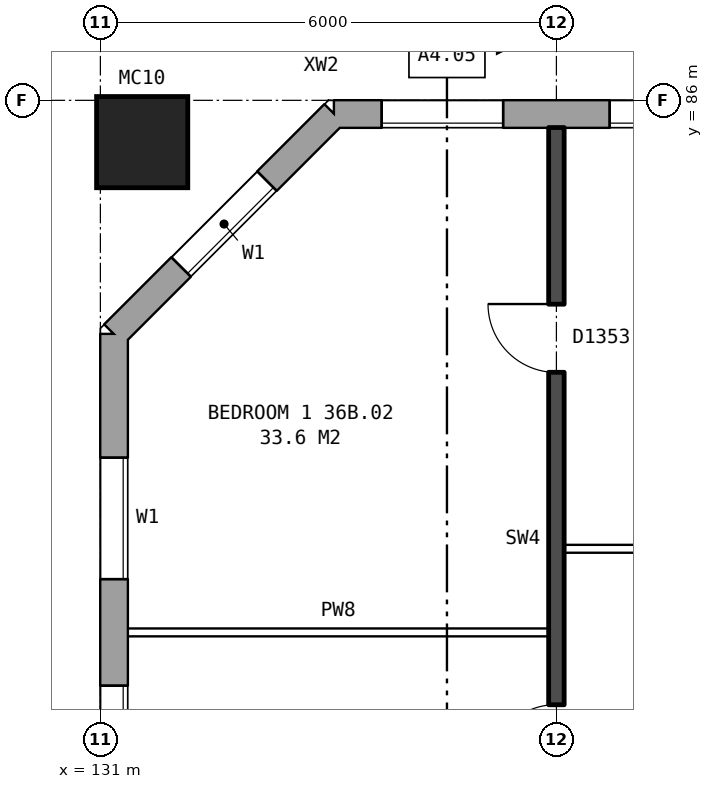
"""IFC4 building model, lengths in metres.
Left out: names, types, materials, properties, quantities, classifications, styles, units other than length and angle.
Written with IfcOpenShell. Run it as: python <this file> out.ifc"""

import sys

from ifc_helpers import new_model, si_unit, direction, frame, frame_2d, origin, origin_2d, place, context, subcontext, project, spatial, rectangle, hollow_rectangle, extrude, element, fill, save


model = new_model("IFC4")
c1 = context("Model", 3, precision=1e-05, world=origin(), true_north=direction((0.0, 1.0)))
c2 = subcontext(c1, "Body", "Model", "MODEL_VIEW")
j1 = project(units=[si_unit("LENGTHUNIT", "METRE"), si_unit("PLANEANGLEUNIT", "RADIAN")], contexts=[c1])
p1 = place(None, origin())
s1 = spatial("IfcSite", under=j1, at=p1, CompositionType="ELEMENT")
p2 = place(p1, origin())
s2 = spatial("IfcBuilding", under=s1, at=p2, CompositionType="ELEMENT")
p3 = place(p2, frame((0.0, 0.0, 129.9)))
s3 = spatial("IfcBuildingStorey", under=s2, at=p3, CompositionType="ELEMENT", Elevation=129.9)
p4 = place(p3, frame((131.55, 85.45, 0.0), z_axis=(0.0, 0.0, 1.0), x_axis=(1.0, 0.0, 0.0)))
e1 = element("IfcColumn", 1, at=p4, inside=s3, PredefinedType="COLUMN", context=c2, shape_type="SweptSolid", body=[
    extrude(hollow_rectangle(XDim=1.2, YDim=1.2, WallThickness=0.065, at=origin_2d()), origin(), (0.0, 0.0, 1.0), 3.1),
])
p5 = place(p3, frame((169.675, 85.82, 0.0), z_axis=(0.0, 0.0, 1.0), x_axis=(-1.0, 0.0, 0.0)))
e2 = element("IfcWall", 2, at=p5, inside=s3, PredefinedType="STANDARD", context=c2, shape_type="SweptSolid", body=[
    extrude(rectangle(XDim=35.601, YDim=0.36, at=frame_2d((17.8, 0.0))), origin(), (0.0, 0.0, 1.0), 2.85),
])
p6 = place(p5, frame((0.375, 0.0, 0.8)))
e3 = element("IfcOpeningElement", 3, at=p6, cuts=e2, PredefinedType="OPENING", context=c2, shape_type="SweptSolid", body=[
    extrude(rectangle(XDim=1.6, YDim=1.8, at=frame_2d((0.8, 0.9))), frame((0.0, 0.19, 0.0), z_axis=(0.0, -1.0, 0.0), x_axis=(1.0, 0.0, 0.0)), (0.0, 0.0, 1.0), 0.38),
])
p7 = place(p5, frame((3.375, 0.0, 0.8)))
e4 = element("IfcOpeningElement", 4, at=p7, cuts=e2, PredefinedType="OPENING", context=c2, shape_type="SweptSolid", body=[
    extrude(rectangle(XDim=1.6, YDim=1.8, at=frame_2d((0.8, 0.9))), frame((0.0, 0.19, 0.0), z_axis=(0.0, -1.0, 0.0), x_axis=(1.0, 0.0, 0.0)), (0.0, 0.0, 1.0), 0.38),
])
p8 = place(p5, frame((5.275, 0.0, 0.8)))
e5 = element("IfcOpeningElement", 5, at=p8, cuts=e2, PredefinedType="OPENING", context=c2, shape_type="SweptSolid", body=[
    extrude(rectangle(XDim=1.6, YDim=1.8, at=frame_2d((0.8, 0.9))), frame((0.0, 0.19, 0.0), z_axis=(0.0, -1.0, 0.0), x_axis=(1.0, 0.0, 0.0)), (0.0, 0.0, 1.0), 0.38),
])
p9 = place(p5, frame((9.375, 0.0, 0.8)))
e6 = element("IfcOpeningElement", 6, at=p9, cuts=e2, PredefinedType="OPENING", context=c2, shape_type="SweptSolid", body=[
    extrude(rectangle(XDim=1.6, YDim=1.8, at=frame_2d((0.8, 0.9))), frame((0.0, 0.19, 0.0), z_axis=(0.0, -1.0, 0.0), x_axis=(1.0, 0.0, 0.0)), (0.0, 0.0, 1.0), 0.38),
])
p10 = place(p5, frame((12.375, 0.0, 0.8)))
e7 = element("IfcOpeningElement", 7, at=p10, cuts=e2, PredefinedType="OPENING", context=c2, shape_type="SweptSolid", body=[
    extrude(rectangle(XDim=1.6, YDim=1.8, at=frame_2d((0.8, 0.9))), frame((0.0, 0.19, 0.0), z_axis=(0.0, -1.0, 0.0), x_axis=(1.0, 0.0, 0.0)), (0.0, 0.0, 1.0), 0.38),
])
p11 = place(p5, frame((15.375, 0.0, 0.8)))
e8 = element("IfcOpeningElement", 8, at=p11, cuts=e2, PredefinedType="OPENING", context=c2, shape_type="SweptSolid", body=[
    extrude(rectangle(XDim=1.6, YDim=1.8, at=frame_2d((0.8, 0.9))), frame((0.0, 0.19, 0.0), z_axis=(0.0, -1.0, 0.0), x_axis=(1.0, 0.0, 0.0)), (0.0, 0.0, 1.0), 0.38),
])
p12 = place(p5, frame((18.375, 0.0, 0.8)))
e9 = element("IfcOpeningElement", 9, at=p12, cuts=e2, PredefinedType="OPENING", context=c2, shape_type="SweptSolid", body=[
    extrude(rectangle(XDim=1.6, YDim=1.8, at=frame_2d((0.8, 0.9))), frame((0.0, 0.19, 0.0), z_axis=(0.0, -1.0, 0.0), x_axis=(1.0, 0.0, 0.0)), (0.0, 0.0, 1.0), 0.38),
])
p13 = place(p5, frame((21.375, 0.0, 0.8)))
e10 = element("IfcOpeningElement", 10, at=p13, cuts=e2, PredefinedType="OPENING", context=c2, shape_type="SweptSolid", body=[
    extrude(rectangle(XDim=1.6, YDim=1.8, at=frame_2d((0.8, 0.9))), frame((0.0, 0.19, 0.0), z_axis=(0.0, -1.0, 0.0), x_axis=(1.0, 0.0, 0.0)), (0.0, 0.0, 1.0), 0.38),
])
p14 = place(p5, frame((24.375, 0.0, 0.8)))
e11 = element("IfcOpeningElement", 11, at=p14, cuts=e2, PredefinedType="OPENING", context=c2, shape_type="SweptSolid", body=[
    extrude(rectangle(XDim=1.6, YDim=1.8, at=frame_2d((0.8, 0.9))), frame((0.0, 0.19, 0.0), z_axis=(0.0, -1.0, 0.0), x_axis=(1.0, 0.0, 0.0)), (0.0, 0.0, 1.0), 0.38),
])
p15 = place(p5, frame((27.825, 0.0, 1.7)))
e12 = element("IfcOpeningElement", 12, at=p15, cuts=e2, PredefinedType="OPENING", context=c2, shape_type="SweptSolid", body=[
    extrude(rectangle(XDim=0.6, YDim=0.9, at=frame_2d((0.3, 0.45))), frame((0.0, 0.19, 0.0), z_axis=(0.0, -1.0, 0.0), x_axis=(1.0, 0.0, 0.0)), (0.0, 0.0, 1.0), 0.38),
])
p16 = place(p5, frame((30.375, 0.0, 0.8)))
e13 = element("IfcOpeningElement", 13, at=p16, cuts=e2, PredefinedType="OPENING", context=c2, shape_type="SweptSolid", body=[
    extrude(rectangle(XDim=1.6, YDim=1.8, at=frame_2d((0.8, 0.9))), frame((0.0, 0.19, 0.0), z_axis=(0.0, -1.0, 0.0), x_axis=(1.0, 0.0, 0.0)), (0.0, 0.0, 1.0), 0.38),
])
p17 = place(p5, frame((33.375, 0.0, 0.8)))
e14 = element("IfcOpeningElement", 14, at=p17, cuts=e2, PredefinedType="OPENING", context=c2, shape_type="SweptSolid", body=[
    extrude(rectangle(XDim=1.6, YDim=1.8, at=frame_2d((0.8, 0.9))), frame((0.0, 0.19, 0.0), z_axis=(0.0, -1.0, 0.0), x_axis=(1.0, 0.0, 0.0)), (0.0, 0.0, 1.0), 0.38),
])
p18 = place(p5, frame((7.175, 0.0, 1.7)))
e15 = element("IfcOpeningElement", 15, at=p18, cuts=e2, PredefinedType="OPENING", context=c2, shape_type="SweptSolid", body=[
    extrude(rectangle(XDim=0.6, YDim=0.9, at=frame_2d((0.3, 0.45))), frame((0.0, 0.19, 0.0), z_axis=(0.0, -1.0, 0.0), x_axis=(1.0, 0.0, 0.0)), (0.0, 0.0, 1.0), 0.38),
])
p19 = place(p5, frame((28.725, 0.0, 0.8)))
e16 = element("IfcOpeningElement", 16, at=p19, cuts=e2, PredefinedType="OPENING", context=c2, shape_type="SweptSolid", body=[
    extrude(rectangle(XDim=1.2, YDim=1.8, at=frame_2d((0.6, 0.9))), frame((0.0, 0.19, 0.0), z_axis=(0.0, -1.0, 0.0), x_axis=(1.0, 0.0, 0.0)), (0.0, 0.0, 1.0), 0.38),
])
p20 = place(p3, frame((134.075, 85.82, 0.0), z_axis=(0.0, 0.0, 1.0), x_axis=(-0.707106781187, -0.707106781187, 0.0)))
e17 = element("IfcWall", 17, at=p20, inside=s3, PredefinedType="STANDARD", context=c2, shape_type="SweptSolid", body=[
    extrude(rectangle(XDim=4.094, YDim=0.36, at=frame_2d((2.047, 0.0))), origin(), (0.0, 0.0, 1.0), 2.85),
])
p21 = place(p20, frame((1.247, 0.0, 0.8)))
e18 = element("IfcOpeningElement", 18, at=p21, cuts=e17, PredefinedType="OPENING", context=c2, shape_type="SweptSolid", body=[
    extrude(rectangle(XDim=1.6, YDim=1.8, at=frame_2d((0.8, 0.9))), frame((0.0, 0.19, 0.0), z_axis=(0.0, -1.0, 0.0), x_axis=(1.0, 0.0, 0.0)), (0.0, 0.0, 1.0), 0.38),
])
p22 = place(p3, frame((131.18, 82.925, 0.0), z_axis=(0.0, 0.0, 1.0), x_axis=(0.0, -1.0, 0.0)))
e19 = element("IfcWall", 19, at=p22, inside=s3, PredefinedType="STANDARD", context=c2, shape_type="SweptSolid", body=[
    extrude(rectangle(XDim=25.851, YDim=0.36, at=frame_2d((12.925, 0.0))), origin(), (0.0, 0.0, 1.0), 2.85),
])
p23 = place(p22, frame((1.625, 0.0, 0.8)))
e20 = element("IfcOpeningElement", 20, at=p23, cuts=e19, PredefinedType="OPENING", context=c2, shape_type="SweptSolid", body=[
    extrude(rectangle(XDim=1.6, YDim=1.8, at=frame_2d((0.8, 0.9))), frame((0.0, 0.19, 0.0), z_axis=(0.0, -1.0, 0.0), x_axis=(1.0, 0.0, 0.0)), (0.0, 0.0, 1.0), 0.38),
])
p24 = place(p22, frame((4.625, 0.0, 0.8)))
e21 = element("IfcOpeningElement", 21, at=p24, cuts=e19, PredefinedType="OPENING", context=c2, shape_type="SweptSolid", body=[
    extrude(rectangle(XDim=1.6, YDim=1.8, at=frame_2d((0.8, 0.9))), frame((0.0, 0.19, 0.0), z_axis=(0.0, -1.0, 0.0), x_axis=(1.0, 0.0, 0.0)), (0.0, 0.0, 1.0), 0.38),
])
p25 = place(p22, frame((19.625, 0.0, 0.8)))
e22 = element("IfcOpeningElement", 22, at=p25, cuts=e19, PredefinedType="OPENING", context=c2, shape_type="SweptSolid", body=[
    extrude(rectangle(XDim=1.6, YDim=1.8, at=frame_2d((0.8, 0.9))), frame((0.0, 0.19, 0.0), z_axis=(0.0, -1.0, 0.0), x_axis=(1.0, 0.0, 0.0)), (0.0, 0.0, 1.0), 0.38),
])
p26 = place(p22, frame((22.625, 0.0, 0.8)))
e23 = element("IfcOpeningElement", 23, at=p26, cuts=e19, PredefinedType="OPENING", context=c2, shape_type="SweptSolid", body=[
    extrude(rectangle(XDim=1.6, YDim=1.8, at=frame_2d((0.8, 0.9))), frame((0.0, 0.19, 0.0), z_axis=(0.0, -1.0, 0.0), x_axis=(1.0, 0.0, 0.0)), (0.0, 0.0, 1.0), 0.38),
])
p27 = place(p3, frame((131.36, 79.0, 0.0), z_axis=(0.0, 0.0, 1.0), x_axis=(1.0, 0.0, 0.0)))
e24 = element("IfcWall", 24, at=p27, inside=s3, PredefinedType="PARTITIONING", context=c2, shape_type="SweptSolid", body=[
    extrude(rectangle(XDim=5.54, YDim=0.1, at=frame_2d((2.77, 0.0))), origin(), (0.0, 0.0, 1.0), 2.85),
])
p28 = place(p3, frame((137.1, 80.1, 0.0), z_axis=(0.0, 0.0, 1.0), x_axis=(1.0, 0.0, 0.0)))
e25 = element("IfcWall", 25, at=p28, inside=s3, PredefinedType="PARTITIONING", context=c2, shape_type="SweptSolid", body=[
    extrude(rectangle(XDim=5.8, YDim=0.1, at=frame_2d((2.9, 0.0))), origin(), (0.0, 0.0, 1.0), 2.85),
])
p29 = place(p28, frame((1.3, 0.0, 0.0)))
e26 = element("IfcOpeningElement", 26, at=p29, cuts=e25, PredefinedType="OPENING", context=c2, shape_type="SweptSolid", body=[
    extrude(rectangle(XDim=0.9, YDim=2.1, at=frame_2d((0.45, 1.05))), frame((0.0, 0.06, 0.0), z_axis=(0.0, -1.0, 0.0), x_axis=(1.0, 0.0, 0.0)), (0.0, 0.0, 1.0), 0.12),
])
p30 = place(p28, frame((4.2, 0.0, 0.0)))
e27 = element("IfcOpeningElement", 27, at=p30, cuts=e25, PredefinedType="OPENING", context=c2, shape_type="SweptSolid", body=[
    extrude(rectangle(XDim=0.9, YDim=2.1, at=frame_2d((0.45, 1.05))), frame((0.0, 0.06, 0.0), z_axis=(0.0, -1.0, 0.0), x_axis=(1.0, 0.0, 0.0)), (0.0, 0.0, 1.0), 0.12),
])
p31 = place(p3, frame((137.0, 76.2, 0.0), z_axis=(0.0, 0.0, 1.0), x_axis=(0.0, 1.0, 0.0)))
e28 = element("IfcWall", 28, at=p31, inside=s3, PredefinedType="SOLIDWALL", context=c2, shape_type="SweptSolid", body=[
    extrude(rectangle(XDim=9.44, YDim=0.2, at=frame_2d((4.72, 0.0))), origin(), (0.0, 0.0, 1.0), 2.85),
])
p32 = place(p31, frame((6.22, 0.0, 0.0)))
e29 = element("IfcOpeningElement", 29, at=p32, cuts=e28, PredefinedType="OPENING", context=c2, shape_type="SweptSolid", body=[
    extrude(rectangle(XDim=0.9, YDim=2.1, at=frame_2d((0.45, 1.05))), frame((0.0, 0.11, 0.0), z_axis=(0.0, -1.0, 0.0), x_axis=(1.0, 0.0, 0.0)), (0.0, 0.0, 1.0), 0.22),
])
p33 = place(p31, frame((0.95, 0.0, 0.0)))
e30 = element("IfcOpeningElement", 30, at=p33, cuts=e28, PredefinedType="OPENING", context=c2, shape_type="SweptSolid", body=[
    extrude(rectangle(XDim=0.9, YDim=2.1, at=frame_2d((0.45, 1.05))), frame((0.0, 0.11, 0.0), z_axis=(0.0, -1.0, 0.0), x_axis=(1.0, 0.0, 0.0)), (0.0, 0.0, 1.0), 0.22),
])
p34 = place(p16, origin())
e31 = element("IfcWindow", 31, at=p34, inside=s3, PartitioningType="SINGLE_PANEL", PredefinedType="WINDOW", context=c2, shape_type="SweptSolid", body=[
    extrude(rectangle(XDim=1.6, YDim=1.8, at=frame_2d((0.8, 0.9))), frame((0.0, 0.15, 0.0), z_axis=(0.0, -1.0, 0.0), x_axis=(1.0, 0.0, 0.0)), (0.0, 0.0, 1.0), 0.06),
])
fill(e13, e31)
p35 = place(p17, origin())
e32 = element("IfcWindow", 32, at=p35, inside=s3, PartitioningType="SINGLE_PANEL", PredefinedType="WINDOW", context=c2, shape_type="SweptSolid", body=[
    extrude(rectangle(XDim=1.6, YDim=1.8, at=frame_2d((0.8, 0.9))), frame((0.0, 0.15, 0.0), z_axis=(0.0, -1.0, 0.0), x_axis=(1.0, 0.0, 0.0)), (0.0, 0.0, 1.0), 0.06),
])
fill(e14, e32)
p36 = place(p21, origin())
e33 = element("IfcWindow", 33, at=p36, inside=s3, PartitioningType="SINGLE_PANEL", PredefinedType="WINDOW", context=c2, shape_type="SweptSolid", body=[
    extrude(rectangle(XDim=1.6, YDim=1.8, at=frame_2d((0.8, 0.9))), frame((0.0, 0.15, 0.0), z_axis=(0.0, -1.0, 0.0), x_axis=(1.0, 0.0, 0.0)), (0.0, 0.0, 1.0), 0.06),
])
fill(e18, e33)
p37 = place(p23, origin())
e34 = element("IfcWindow", 34, at=p37, inside=s3, PartitioningType="SINGLE_PANEL", PredefinedType="WINDOW", context=c2, shape_type="SweptSolid", body=[
    extrude(rectangle(XDim=1.6, YDim=1.8, at=frame_2d((0.8, 0.9))), frame((0.0, 0.15, 0.0), z_axis=(0.0, -1.0, 0.0), x_axis=(1.0, 0.0, 0.0)), (0.0, 0.0, 1.0), 0.06),
])
fill(e20, e34)
p38 = place(p24, origin())
e35 = element("IfcWindow", 35, at=p38, inside=s3, PartitioningType="SINGLE_PANEL", PredefinedType="WINDOW", context=c2, shape_type="SweptSolid", body=[
    extrude(rectangle(XDim=1.6, YDim=1.8, at=frame_2d((0.8, 0.9))), frame((0.0, 0.15, 0.0), z_axis=(0.0, -1.0, 0.0), x_axis=(1.0, 0.0, 0.0)), (0.0, 0.0, 1.0), 0.06),
])
fill(e21, e35)
p39 = place(p32, origin())
e36 = element("IfcDoor", 36, at=p39, inside=s3, OperationType="SINGLE_SWING_RIGHT", PredefinedType="DOOR", context=c2, shape_type="SweptSolid", body=[
    extrude(rectangle(XDim=0.9, YDim=2.1, at=frame_2d((0.45, 1.05))), frame((0.0, 0.025, 0.0), z_axis=(0.0, -1.0, 0.0), x_axis=(1.0, 0.0, 0.0)), (0.0, 0.0, 1.0), 0.05),
])
fill(e29, e36)
p40 = place(p33, origin())
e37 = element("IfcDoor", 37, at=p40, inside=s3, OperationType="SINGLE_SWING_LEFT", PredefinedType="DOOR", context=c2, shape_type="SweptSolid", body=[
    extrude(rectangle(XDim=0.9, YDim=2.1, at=frame_2d((0.45, 1.05))), frame((0.0, 0.025, 0.0), z_axis=(0.0, -1.0, 0.0), x_axis=(1.0, 0.0, 0.0)), (0.0, 0.0, 1.0), 0.05),
])
fill(e30, e37)
save(model, sys.argv[1])
